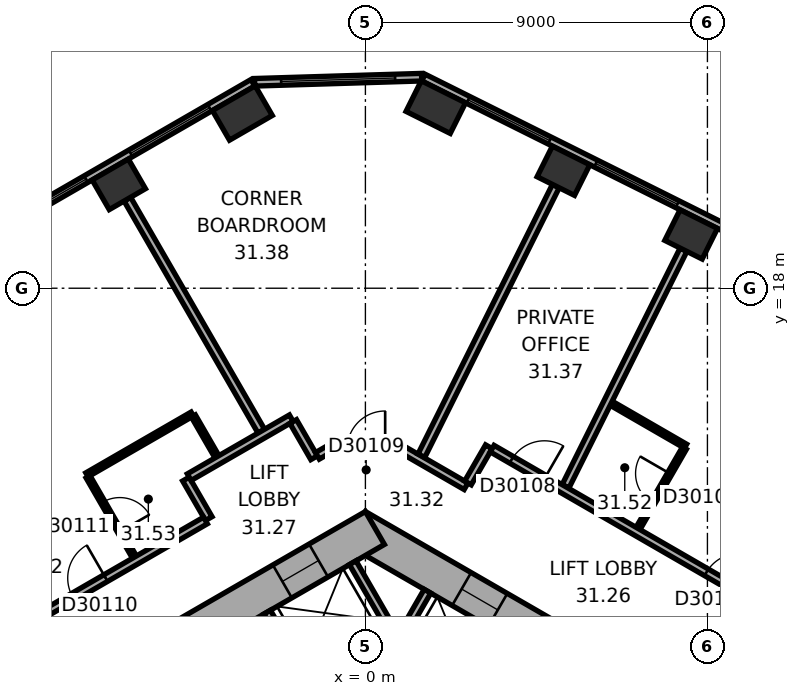
"""IFC4 building model, lengths in metres.
Left out: names, types, materials, properties, quantities, classifications, styles, units other than length and angle.
Written with IfcOpenShell. Run it as: python <this file> out.ifc"""

import sys

from ifc_helpers import new_model, si_unit, direction, frame, frame_2d, origin, origin_2d, place, context, subcontext, project, spatial, rectangle, extrude, element, fill, save


model = new_model("IFC4")
c1 = context("Model", 3, precision=1e-05, world=origin(), true_north=direction((0.0, 1.0)))
c2 = subcontext(c1, "Body", "Model", "MODEL_VIEW")
j1 = project(units=[si_unit("LENGTHUNIT", "METRE"), si_unit("PLANEANGLEUNIT", "RADIAN")], contexts=[c1])
p1 = place(None, origin())
s1 = spatial("IfcSite", under=j1, at=p1, CompositionType="ELEMENT")
p2 = place(p1, origin())
s2 = spatial("IfcBuilding", under=s1, at=p2, CompositionType="ELEMENT")
p3 = place(p2, frame((0.0, 0.0, 128.1)))
s3 = spatial("IfcBuildingStorey", under=s2, at=p3, CompositionType="ELEMENT", Elevation=128.1)
for number, where, z_axis, x_axis in (
    (1, (8.571, 19.416, 0.0), (0.0, 0.0, 1.0), (-0.895, 0.446, 0.0)),
    (2, (5.211, 21.091, 0.0), (0.0, 0.0, 1.0), (-0.895, 0.446, 0.0)),
):
    element("IfcColumn", number, at=place(p3, frame(where, z_axis=z_axis, x_axis=x_axis)), inside=s3, PredefinedType="COLUMN", context=c2, shape_type="SweptSolid", body=[
        extrude(rectangle(XDim=1.1, YDim=0.9, at=origin_2d()), origin(), (0.0, 0.0, 1.0), 3.7),
    ])
for number, where, z_axis, x_axis in (
    (3, (1.852, 22.766, 0.0), (0.0, 0.0, 1.0), (-0.895, 0.446, 0.0)),
    (4, (-3.238, 22.61, 0.0), (0.0, 0.0, 1.0), (-0.866, -0.5, 0.0)),
):
    element("IfcColumn", number, at=place(p3, frame(where, z_axis=z_axis, x_axis=x_axis)), inside=s3, PredefinedType="COLUMN", context=c2, shape_type="SweptSolid", body=[
        extrude(rectangle(XDim=1.3, YDim=0.9, at=origin_2d()), origin(), (0.0, 0.0, 1.0), 3.7),
    ])
p4 = place(p3, frame((-6.489, 20.733, 0.0), z_axis=(0.0, 0.0, 1.0), x_axis=(-0.866025403784, -0.5, 0.0)))
e5 = element("IfcColumn", 5, at=p4, inside=s3, PredefinedType="COLUMN", context=c2, shape_type="SweptSolid", body=[
    extrude(rectangle(XDim=1.1, YDim=0.9, at=origin_2d()), origin(), (0.0, 0.0, 1.0), 3.7),
])
p5 = place(p3, frame((10.25, 5.629, 0.0), z_axis=(0.0, 0.0, 1.0), x_axis=(-0.866022616891, 0.50000482701, 0.0)))
e6 = element("IfcWall", 6, at=p5, inside=s3, PredefinedType="SHEAR", context=c2, shape_type="SweptSolid", body=[
    extrude(rectangle(XDim=12.125, YDim=1.0, at=frame_2d((6.062, 0.0))), origin(), (0.0, 0.0, 1.0), 3.7),
])
p6 = place(p5, frame((2.612, 0.0, 0.0)))
e7 = element("IfcOpeningElement", 7, at=p6, cuts=e6, PredefinedType="OPENING", context=c2, shape_type="SweptSolid", body=[
    extrude(rectangle(XDim=1.1, YDim=2.1, at=frame_2d((0.55, 1.05))), frame((0.0, 0.51, 0.0), z_axis=(0.0, -1.0, 0.0), x_axis=(1.0, 0.0, 0.0)), (0.0, 0.0, 1.0), 1.02),
])
p7 = place(p5, frame((5.212, 0.0, 0.0)))
e8 = element("IfcOpeningElement", 8, at=p7, cuts=e6, PredefinedType="OPENING", context=c2, shape_type="SweptSolid", body=[
    extrude(rectangle(XDim=1.1, YDim=2.1, at=frame_2d((0.55, 1.05))), frame((0.0, 0.51, 0.0), z_axis=(0.0, -1.0, 0.0), x_axis=(1.0, 0.0, 0.0)), (0.0, 0.0, 1.0), 1.02),
])
p8 = place(p5, frame((7.812, 0.0, 0.0)))
e9 = element("IfcOpeningElement", 9, at=p8, cuts=e6, PredefinedType="OPENING", context=c2, shape_type="SweptSolid", body=[
    extrude(rectangle(XDim=1.1, YDim=2.1, at=frame_2d((0.55, 1.05))), frame((0.0, 0.51, 0.0), z_axis=(0.0, -1.0, 0.0), x_axis=(1.0, 0.0, 0.0)), (0.0, 0.0, 1.0), 1.02),
])
p9 = place(p3, frame((0.25, 11.691, 0.0), z_axis=(0.0, 0.0, 1.0), x_axis=(-0.866022616891, -0.50000482701, 0.0)))
e10 = element("IfcWall", 10, at=p9, inside=s3, PredefinedType="SHEAR", context=c2, shape_type="SweptSolid", body=[
    extrude(rectangle(XDim=12.125, YDim=1.0, at=frame_2d((6.062, 0.0))), origin(), (0.0, 0.0, 1.0), 3.7),
])
p10 = place(p9, frame((6.262, 0.0, 0.0)))
e11 = element("IfcOpeningElement", 11, at=p10, cuts=e10, PredefinedType="OPENING", context=c2, shape_type="SweptSolid", body=[
    extrude(rectangle(XDim=1.5, YDim=2.1, at=frame_2d((0.75, 1.05))), frame((0.0, 0.51, 0.0), z_axis=(0.0, -1.0, 0.0), x_axis=(1.0, 0.0, 0.0)), (0.0, 0.0, 1.0), 1.02),
])
p11 = place(p9, frame((1.712, 0.0, 0.0)))
e12 = element("IfcOpeningElement", 12, at=p11, cuts=e10, PredefinedType="OPENING", context=c2, shape_type="SweptSolid", body=[
    extrude(rectangle(XDim=1.1, YDim=2.1, at=frame_2d((0.55, 1.05))), frame((0.0, 0.51, 0.0), z_axis=(0.0, -1.0, 0.0), x_axis=(1.0, 0.0, 0.0)), (0.0, 0.0, 1.0), 1.02),
])
p12 = place(p3, frame((19.464, 14.599, 0.0), z_axis=(0.0, 0.0, 1.0), x_axis=(-0.894935755043, 0.446195018289, 0.0)))
e13 = element("IfcWall", 13, at=p12, inside=s3, PredefinedType="STANDARD", context=c2, shape_type="SweptSolid", body=[
    extrude(rectangle(XDim=20.044, YDim=0.2, at=frame_2d((10.022, 0.0))), origin(), (0.0, 0.0, 1.0), 3.7),
])
p13 = place(p12, frame((1.313, 0.0, 0.9)))
e14 = element("IfcOpeningElement", 14, at=p13, cuts=e13, PredefinedType="OPENING", context=c2, shape_type="SweptSolid", body=[
    extrude(rectangle(XDim=2.4, YDim=2.0, at=frame_2d((1.2, 1.0))), frame((0.0, 0.11, 0.0), z_axis=(0.0, -1.0, 0.0), x_axis=(1.0, 0.0, 0.0)), (0.0, 0.0, 1.0), 0.22),
])
p14 = place(p12, frame((5.067, 0.0, 0.9)))
e15 = element("IfcOpeningElement", 15, at=p14, cuts=e13, PredefinedType="OPENING", context=c2, shape_type="SweptSolid", body=[
    extrude(rectangle(XDim=2.4, YDim=2.0, at=frame_2d((1.2, 1.0))), frame((0.0, 0.11, 0.0), z_axis=(0.0, -1.0, 0.0), x_axis=(1.0, 0.0, 0.0)), (0.0, 0.0, 1.0), 0.22),
])
p15 = place(p12, frame((8.821, 0.0, 0.9)))
e16 = element("IfcOpeningElement", 16, at=p15, cuts=e13, PredefinedType="OPENING", context=c2, shape_type="SweptSolid", body=[
    extrude(rectangle(XDim=2.4, YDim=2.0, at=frame_2d((1.2, 1.0))), frame((0.0, 0.11, 0.0), z_axis=(0.0, -1.0, 0.0), x_axis=(1.0, 0.0, 0.0)), (0.0, 0.0, 1.0), 0.22),
])
p16 = place(p12, frame((12.575, 0.0, 0.9)))
e17 = element("IfcOpeningElement", 17, at=p16, cuts=e13, PredefinedType="OPENING", context=c2, shape_type="SweptSolid", body=[
    extrude(rectangle(XDim=2.4, YDim=2.0, at=frame_2d((1.2, 1.0))), frame((0.0, 0.11, 0.0), z_axis=(0.0, -1.0, 0.0), x_axis=(1.0, 0.0, 0.0)), (0.0, 0.0, 1.0), 0.22),
])
p17 = place(p12, frame((16.329, 0.0, 0.9)))
e18 = element("IfcOpeningElement", 18, at=p17, cuts=e13, PredefinedType="OPENING", context=c2, shape_type="SweptSolid", body=[
    extrude(rectangle(XDim=2.4, YDim=2.0, at=frame_2d((1.2, 1.0))), frame((0.0, 0.11, 0.0), z_axis=(0.0, -1.0, 0.0), x_axis=(1.0, 0.0, 0.0)), (0.0, 0.0, 1.0), 0.22),
])
p18 = place(p3, frame((1.479, 23.553, 0.0), z_axis=(0.0, 0.0, 1.0), x_axis=(-0.999534786117, -0.03049936625, 0.0)))
e19 = element("IfcWall", 19, at=p18, inside=s3, PredefinedType="STANDARD", context=c2, shape_type="SweptSolid", body=[
    extrude(rectangle(XDim=4.395, YDim=0.2, at=frame_2d((2.197, 0.0))), origin(), (0.0, 0.0, 1.0), 3.7),
])
p19 = place(p18, frame((0.698, 0.0, 0.9)))
e20 = element("IfcOpeningElement", 20, at=p19, cuts=e19, PredefinedType="OPENING", context=c2, shape_type="SweptSolid", body=[
    extrude(rectangle(XDim=3.0, YDim=2.0, at=frame_2d((1.5, 1.0))), frame((0.0, 0.11, 0.0), z_axis=(0.0, -1.0, 0.0), x_axis=(1.0, 0.0, 0.0)), (0.0, 0.0, 1.0), 0.22),
])
p20 = place(p3, frame((-2.961, 23.405, 0.0), z_axis=(0.0, 0.0, 1.0), x_axis=(-0.866023315909, -0.500003616288, 0.0)))
e21 = element("IfcWall", 21, at=p20, inside=s3, PredefinedType="STANDARD", context=c2, shape_type="SweptSolid", body=[
    extrude(rectangle(XDim=20.044, YDim=0.2, at=frame_2d((10.022, 0.0))), origin(), (0.0, 0.0, 1.0), 3.7),
])
p21 = place(p20, frame((1.314, 0.0, 0.9)))
e22 = element("IfcOpeningElement", 22, at=p21, cuts=e21, PredefinedType="OPENING", context=c2, shape_type="SweptSolid", body=[
    extrude(rectangle(XDim=2.4, YDim=2.0, at=frame_2d((1.2, 1.0))), frame((0.0, 0.11, 0.0), z_axis=(0.0, -1.0, 0.0), x_axis=(1.0, 0.0, 0.0)), (0.0, 0.0, 1.0), 0.22),
])
p22 = place(p20, frame((5.069, 0.0, 0.9)))
e23 = element("IfcOpeningElement", 23, at=p22, cuts=e21, PredefinedType="OPENING", context=c2, shape_type="SweptSolid", body=[
    extrude(rectangle(XDim=2.4, YDim=2.0, at=frame_2d((1.2, 1.0))), frame((0.0, 0.11, 0.0), z_axis=(0.0, -1.0, 0.0), x_axis=(1.0, 0.0, 0.0)), (0.0, 0.0, 1.0), 0.22),
])
p23 = place(p20, frame((8.823, 0.0, 0.9)))
e24 = element("IfcOpeningElement", 24, at=p23, cuts=e21, PredefinedType="OPENING", context=c2, shape_type="SweptSolid", body=[
    extrude(rectangle(XDim=2.4, YDim=2.0, at=frame_2d((1.2, 1.0))), frame((0.0, 0.11, 0.0), z_axis=(0.0, -1.0, 0.0), x_axis=(1.0, 0.0, 0.0)), (0.0, 0.0, 1.0), 0.22),
])
p24 = place(p20, frame((12.577, 0.0, 0.9)))
e25 = element("IfcOpeningElement", 25, at=p24, cuts=e21, PredefinedType="OPENING", context=c2, shape_type="SweptSolid", body=[
    extrude(rectangle(XDim=2.4, YDim=2.0, at=frame_2d((1.2, 1.0))), frame((0.0, 0.11, 0.0), z_axis=(0.0, -1.0, 0.0), x_axis=(1.0, 0.0, 0.0)), (0.0, 0.0, 1.0), 0.22),
])
p25 = place(p20, frame((16.331, 0.0, 0.9)))
e26 = element("IfcOpeningElement", 26, at=p25, cuts=e21, PredefinedType="OPENING", context=c2, shape_type="SweptSolid", body=[
    extrude(rectangle(XDim=2.4, YDim=2.0, at=frame_2d((1.2, 1.0))), frame((0.0, 0.11, 0.0), z_axis=(0.0, -1.0, 0.0), x_axis=(1.0, 0.0, 0.0)), (0.0, 0.0, 1.0), 0.22),
])
p26 = place(p3, frame((0.532, 8.122, 0.0), z_axis=(0.0, 0.0, 1.0), x_axis=(0.500077893725, 0.86598042715, 0.0)))
e27 = element("IfcWall", 27, at=p26, inside=s3, PredefinedType="PARTITIONING", context=c2, shape_type="SweptSolid", body=[
    extrude(rectangle(XDim=2.2, YDim=0.2, at=frame_2d((1.1, 0.0))), origin(), (0.0, 0.0, 1.0), 3.42),
])
p27 = place(p3, frame((0.767, 8.872, 0.0), z_axis=(0.0, 0.0, 1.0), x_axis=(-0.499994660107, 0.866028486751, 0.0)))
e28 = element("IfcWall", 28, at=p27, inside=s3, PredefinedType="PARTITIONING", context=c2, shape_type="SweptSolid", body=[
    extrude(rectangle(XDim=2.2, YDim=0.2, at=frame_2d((1.1, 0.0))), origin(), (0.0, 0.0, 1.0), 3.42),
])
p28 = place(p3, frame((-1.485, 7.572, 0.0), z_axis=(0.0, 0.0, 1.0), x_axis=(-0.50002983664, 0.866008176907, 0.0)))
e29 = element("IfcWall", 29, at=p28, inside=s3, PredefinedType="PARTITIONING", context=c2, shape_type="SweptSolid", body=[
    extrude(rectangle(XDim=2.2, YDim=0.2, at=frame_2d((1.1, 0.0))), origin(), (0.0, 0.0, 1.0), 3.42),
])
p29 = place(p3, frame((-7.328, 13.09, 0.0), z_axis=(0.0, 0.0, 1.0), x_axis=(0.866008981251, 0.500028443584, 0.0)))
e30 = element("IfcWall", 30, at=p29, inside=s3, PredefinedType="PARTITIONING", context=c2, shape_type="SweptSolid", body=[
    extrude(rectangle(XDim=3.2, YDim=0.12, at=frame_2d((1.6, 0.0))), origin(), (0.0, 0.0, 1.0), 3.42),
])
p30 = place(p3, frame((-6.264, 20.344, 0.0), z_axis=(0.0, 0.0, 1.0), x_axis=(0.500009260695, -0.866020057054, 0.0)))
e31 = element("IfcWall", 31, at=p30, inside=s3, PredefinedType="PARTITIONING", context=c2, shape_type="SweptSolid", body=[
    extrude(rectangle(XDim=7.049, YDim=0.2, at=frame_2d((3.524, 0.0))), origin(), (0.0, 0.0, 1.0), 3.42),
])
p31 = place(p3, frame((-6.078, 10.925, 0.0), z_axis=(0.0, 0.0, 1.0), x_axis=(-0.500002508028, 0.866023955769, 0.0)))
e32 = element("IfcWall", 32, at=p31, inside=s3, PredefinedType="PARTITIONING", context=c2, shape_type="SweptSolid", body=[
    extrude(rectangle(XDim=2.44, YDim=0.12, at=frame_2d((1.22, 0.0))), origin(), (0.0, 0.0, 1.0), 2.87),
])
p32 = place(p31, frame((0.77, 0.0, 0.0)))
e33 = element("IfcOpeningElement", 33, at=p32, cuts=e32, PredefinedType="OPENING", context=c2, shape_type="SweptSolid", body=[
    extrude(rectangle(XDim=0.9, YDim=2.1, at=frame_2d((0.45, 1.05))), frame((0.0, 0.07, 0.0), z_axis=(0.0, -1.0, 0.0), x_axis=(1.0, 0.0, 0.0)), (0.0, 0.0, 1.0), 0.14),
])
p33 = place(p3, frame((-4.723, 12.978, 0.0), z_axis=(0.0, 0.0, 1.0), x_axis=(0.500074377092, -0.865982457891, 0.0)))
e34 = element("IfcWall", 34, at=p33, inside=s3, PredefinedType="PARTITIONING", context=c2, shape_type="SweptSolid", body=[
    extrude(rectangle(XDim=1.201, YDim=0.2, at=frame_2d((0.601, 0.0))), origin(), (0.0, 0.0, 1.0), 3.42),
])
p34 = place(p3, frame((-4.526, 14.638, 0.0), z_axis=(0.0, 0.0, 1.0), x_axis=(0.499932836684, -0.86606417707, 0.0)))
e35 = element("IfcWall", 35, at=p34, inside=s3, PredefinedType="PARTITIONING", context=c2, shape_type="SweptSolid", body=[
    extrude(rectangle(XDim=1.239, YDim=0.12, at=frame_2d((0.62, 0.0))), origin(), (0.0, 0.0, 1.0), 3.42),
])
p35 = place(p3, frame((-4.209, 11.888, 0.0), z_axis=(0.0, 0.0, 1.0), x_axis=(-0.866020930448, -0.500007747966, 0.0)))
e36 = element("IfcWall", 36, at=p35, inside=s3, PredefinedType="PARTITIONING", context=c2, shape_type="SweptSolid", body=[
    extrude(rectangle(XDim=8.321, YDim=0.2, at=frame_2d((4.161, 0.0))), origin(), (0.0, 0.0, 1.0), 3.42),
])
p36 = place(p35, frame((3.031, 0.0, 0.0)))
e37 = element("IfcOpeningElement", 37, at=p36, cuts=e36, PredefinedType="OPENING", context=c2, shape_type="SweptSolid", body=[
    extrude(rectangle(XDim=1.0, YDim=2.1, at=frame_2d((0.5, 1.05))), frame((0.0, 0.11, 0.0), z_axis=(0.0, -1.0, 0.0), x_axis=(1.0, 0.0, 0.0)), (0.0, 0.0, 1.0), 0.22),
])
p37 = place(p3, frame((-1.95, 14.579, 0.0), z_axis=(0.0, 0.0, 1.0), x_axis=(-0.866011260204, -0.500024496599, 0.0)))
e38 = element("IfcWall", 38, at=p37, inside=s3, PredefinedType="PARTITIONING", context=c2, shape_type="SweptSolid", body=[
    extrude(rectangle(XDim=3.102, YDim=0.2, at=frame_2d((1.551, 0.0))), origin(), (0.0, 0.0, 1.0), 3.42),
])
p38 = place(p3, frame((-1.349, 13.539, 0.0), z_axis=(0.0, 0.0, 1.0), x_axis=(-0.500074377092, 0.865982457891, 0.0)))
e39 = element("IfcWall", 39, at=p38, inside=s3, PredefinedType="PARTITIONING", context=c2, shape_type="SweptSolid", body=[
    extrude(rectangle(XDim=1.101, YDim=0.2, at=frame_2d((0.55, 0.0))), origin(), (0.0, 0.0, 1.0), 3.42),
])
p39 = place(p3, frame((-0.95, 13.77, 0.0), z_axis=(0.0, 0.0, 1.0), x_axis=(-0.865904111586, -0.500210025428, 0.0)))
e40 = element("IfcWall", 40, at=p39, inside=s3, PredefinedType="PARTITIONING", context=c2, shape_type="SweptSolid", body=[
    extrude(rectangle(XDim=0.361, YDim=0.2, at=frame_2d((0.181, 0.0))), origin(), (0.0, 0.0, 1.0), 3.42),
])
p40 = place(p3, frame((0.95, 13.77, 0.0), z_axis=(0.0, 0.0, 1.0), x_axis=(-1.0, 0.0, 0.0)))
e41 = element("IfcWall", 41, at=p40, inside=s3, PredefinedType="PARTITIONING", context=c2, shape_type="SweptSolid", body=[
    extrude(rectangle(XDim=1.86, YDim=0.2, at=frame_2d((0.93, 0.0))), origin(), (0.0, 0.0, 1.0), 3.42),
])
p41 = place(p40, frame((0.43, 0.0, 0.0)))
e42 = element("IfcOpeningElement", 42, at=p41, cuts=e41, PredefinedType="OPENING", context=c2, shape_type="SweptSolid", body=[
    extrude(rectangle(XDim=1.0, YDim=2.1, at=frame_2d((0.5, 1.05))), frame((0.0, 0.11, 0.0), z_axis=(0.0, -1.0, 0.0), x_axis=(1.0, 0.0, 0.0)), (0.0, 0.0, 1.0), 0.22),
])
p42 = place(p3, frame((2.648, 12.789, 0.0), z_axis=(0.0, 0.0, 1.0), x_axis=(-0.8660607342, 0.499938800931, 0.0)))
e43 = element("IfcWall", 43, at=p42, inside=s3, PredefinedType="PARTITIONING", context=c2, shape_type="SweptSolid", body=[
    extrude(rectangle(XDim=1.921, YDim=0.2, at=frame_2d((0.96, 0.0))), origin(), (0.0, 0.0, 1.0), 3.42),
])
p43 = place(p3, frame((3.249, 13.829, 0.0), z_axis=(0.0, 0.0, 1.0), x_axis=(-0.499812034598, -0.866133898465, 0.0)))
e44 = element("IfcWall", 44, at=p43, inside=s3, PredefinedType="PARTITIONING", context=c2, shape_type="SweptSolid", body=[
    extrude(rectangle(XDim=1.101, YDim=0.2, at=frame_2d((0.551, 0.0))), origin(), (0.0, 0.0, 1.0), 3.42),
])
p44 = place(p3, frame((5.01, 20.688, 0.0), z_axis=(0.0, 0.0, 1.0), x_axis=(-0.446203062394, -0.894931744386, 0.0)))
e45 = element("IfcWall", 45, at=p44, inside=s3, PredefinedType="PARTITIONING", context=c2, shape_type="SweptSolid", body=[
    extrude(rectangle(XDim=7.927, YDim=0.2, at=frame_2d((3.963, 0.0))), origin(), (0.0, 0.0, 1.0), 2.87),
])
p45 = place(p3, frame((6.468, 14.973, 0.0), z_axis=(0.0, 0.0, 1.0), x_axis=(0.865993004593, -0.500056112848, 0.0)))
e46 = element("IfcWall", 46, at=p45, inside=s3, PredefinedType="PARTITIONING", context=c2, shape_type="SweptSolid", body=[
    extrude(rectangle(XDim=2.259, YDim=0.12, at=frame_2d((1.129, 0.0))), origin(), (0.0, 0.0, 1.0), 3.42),
])
p46 = place(p3, frame((8.37, 19.013, 0.0), z_axis=(0.0, 0.0, 1.0), x_axis=(-0.446187985757, -0.894939261272, 0.0)))
e47 = element("IfcWall", 47, at=p46, inside=s3, PredefinedType="PARTITIONING", context=c2, shape_type="SweptSolid", body=[
    extrude(rectangle(XDim=6.953, YDim=0.2, at=frame_2d((3.477, 0.0))), origin(), (0.0, 0.0, 1.0), 3.42),
])
p47 = place(p3, frame((8.394, 13.792, 0.0), z_axis=(0.0, 0.0, 1.0), x_axis=(-0.500002508028, -0.866023955769, 0.0)))
e48 = element("IfcWall", 48, at=p47, inside=s3, PredefinedType="PARTITIONING", context=c2, shape_type="SweptSolid", body=[
    extrude(rectangle(XDim=2.44, YDim=0.12, at=frame_2d((1.22, 0.0))), origin(), (0.0, 0.0, 1.0), 3.42),
])
p48 = place(p47, frame((0.77, 0.0, 0.0)))
e49 = element("IfcOpeningElement", 49, at=p48, cuts=e48, PredefinedType="OPENING", context=c2, shape_type="SweptSolid", body=[
    extrude(rectangle(XDim=0.9, YDim=2.1, at=frame_2d((0.45, 1.05))), frame((0.0, 0.07, 0.0), z_axis=(0.0, -1.0, 0.0), x_axis=(1.0, 0.0, 0.0)), (0.0, 0.0, 1.0), 0.14),
])
p49 = place(p3, frame((11.646, 8.981, 0.0), z_axis=(0.0, 0.0, 1.0), x_axis=(-0.866027142779, 0.499996987961, 0.0)))
e50 = element("IfcWall", 50, at=p49, inside=s3, PredefinedType="PARTITIONING", context=c2, shape_type="SweptSolid", body=[
    extrude(rectangle(XDim=9.597, YDim=0.2, at=frame_2d((4.798, 0.0))), origin(), (0.0, 0.0, 1.0), 3.42),
])
p50 = place(p49, frame((2.086, 0.0, 0.0)))
e51 = element("IfcOpeningElement", 51, at=p50, cuts=e50, PredefinedType="OPENING", context=c2, shape_type="SweptSolid", body=[
    extrude(rectangle(XDim=1.0, YDim=2.1, at=frame_2d((0.5, 1.05))), frame((0.0, 0.11, 0.0), z_axis=(0.0, -1.0, 0.0), x_axis=(1.0, 0.0, 0.0)), (0.0, 0.0, 1.0), 0.22),
])
p51 = place(p49, frame((8.01, 0.0, 0.0)))
e52 = element("IfcOpeningElement", 52, at=p51, cuts=e50, PredefinedType="OPENING", context=c2, shape_type="SweptSolid", body=[
    extrude(rectangle(XDim=1.0, YDim=2.1, at=frame_2d((0.5, 1.05))), frame((0.0, 0.11, 0.0), z_axis=(0.0, -1.0, 0.0), x_axis=(1.0, 0.0, 0.0)), (0.0, 0.0, 1.0), 0.22),
])
p52 = place(p16, origin())
e53 = element("IfcWindow", 53, at=p52, inside=s3, PartitioningType="SINGLE_PANEL", PredefinedType="WINDOW", context=c2, shape_type="SweptSolid", body=[
    extrude(rectangle(XDim=2.4, YDim=2.0, at=frame_2d((1.2, 1.0))), frame((0.0, 0.03, 0.0), z_axis=(0.0, -1.0, 0.0), x_axis=(1.0, 0.0, 0.0)), (0.0, 0.0, 1.0), 0.06),
])
fill(e17, e53)
p53 = place(p17, origin())
e54 = element("IfcWindow", 54, at=p53, inside=s3, PartitioningType="SINGLE_PANEL", PredefinedType="WINDOW", context=c2, shape_type="SweptSolid", body=[
    extrude(rectangle(XDim=2.4, YDim=2.0, at=frame_2d((1.2, 1.0))), frame((0.0, 0.03, 0.0), z_axis=(0.0, -1.0, 0.0), x_axis=(1.0, 0.0, 0.0)), (0.0, 0.0, 1.0), 0.06),
])
fill(e18, e54)
p54 = place(p19, origin())
e55 = element("IfcWindow", 55, at=p54, inside=s3, PartitioningType="SINGLE_PANEL", PredefinedType="WINDOW", context=c2, shape_type="SweptSolid", body=[
    extrude(rectangle(XDim=3.0, YDim=2.0, at=frame_2d((1.5, 1.0))), frame((0.0, 0.03, 0.0), z_axis=(0.0, -1.0, 0.0), x_axis=(1.0, 0.0, 0.0)), (0.0, 0.0, 1.0), 0.06),
])
fill(e20, e55)
p55 = place(p21, origin())
e56 = element("IfcWindow", 56, at=p55, inside=s3, PartitioningType="SINGLE_PANEL", PredefinedType="WINDOW", context=c2, shape_type="SweptSolid", body=[
    extrude(rectangle(XDim=2.4, YDim=2.0, at=frame_2d((1.2, 1.0))), frame((0.0, 0.03, 0.0), z_axis=(0.0, -1.0, 0.0), x_axis=(1.0, 0.0, 0.0)), (0.0, 0.0, 1.0), 0.06),
])
fill(e22, e56)
p56 = place(p22, origin())
e57 = element("IfcWindow", 57, at=p56, inside=s3, PartitioningType="SINGLE_PANEL", PredefinedType="WINDOW", context=c2, shape_type="SweptSolid", body=[
    extrude(rectangle(XDim=2.4, YDim=2.0, at=frame_2d((1.2, 1.0))), frame((0.0, 0.03, 0.0), z_axis=(0.0, -1.0, 0.0), x_axis=(1.0, 0.0, 0.0)), (0.0, 0.0, 1.0), 0.06),
])
fill(e23, e57)
p57 = place(p8, origin())
e58 = element("IfcDoor", 58, at=p57, inside=s3, OperationType="DOUBLE_DOOR_SLIDING", PredefinedType="DOOR", context=c2, shape_type="SweptSolid", body=[
    extrude(rectangle(XDim=1.1, YDim=2.1, at=frame_2d((0.55, 1.05))), frame((0.0, 0.025, 0.0), z_axis=(0.0, -1.0, 0.0), x_axis=(1.0, 0.0, 0.0)), (0.0, 0.0, 1.0), 0.05),
])
fill(e9, e58)
p58 = place(p11, origin())
e59 = element("IfcDoor", 59, at=p58, inside=s3, OperationType="DOUBLE_DOOR_SLIDING", PredefinedType="DOOR", context=c2, shape_type="SweptSolid", body=[
    extrude(rectangle(XDim=1.1, YDim=2.1, at=frame_2d((0.55, 1.05))), frame((0.0, 0.025, 0.0), z_axis=(0.0, -1.0, 0.0), x_axis=(1.0, 0.0, 0.0)), (0.0, 0.0, 1.0), 0.05),
])
fill(e12, e59)
p59 = place(p50, origin())
e60 = element("IfcDoor", 60, at=p59, inside=s3, OperationType="SINGLE_SWING_LEFT", PredefinedType="DOOR", context=c2, shape_type="SweptSolid", body=[
    extrude(rectangle(XDim=1.0, YDim=2.1, at=frame_2d((0.5, 1.05))), frame((0.0, 0.025, 0.0), z_axis=(0.0, -1.0, 0.0), x_axis=(1.0, 0.0, 0.0)), (0.0, 0.0, 1.0), 0.05),
])
fill(e51, e60)
p60 = place(p48, origin())
e61 = element("IfcDoor", 61, at=p60, inside=s3, OperationType="SINGLE_SWING_LEFT", PredefinedType="DOOR", context=c2, shape_type="SweptSolid", body=[
    extrude(rectangle(XDim=0.9, YDim=2.1, at=frame_2d((0.45, 1.05))), frame((0.0, 0.025, 0.0), z_axis=(0.0, -1.0, 0.0), x_axis=(1.0, 0.0, 0.0)), (0.0, 0.0, 1.0), 0.05),
])
fill(e49, e61)
p61 = place(p51, origin())
e62 = element("IfcDoor", 62, at=p61, inside=s3, OperationType="SINGLE_SWING_LEFT", PredefinedType="DOOR", context=c2, shape_type="SweptSolid", body=[
    extrude(rectangle(XDim=1.0, YDim=2.1, at=frame_2d((0.5, 1.05))), frame((0.0, 0.025, 0.0), z_axis=(0.0, -1.0, 0.0), x_axis=(1.0, 0.0, 0.0)), (0.0, 0.0, 1.0), 0.05),
])
fill(e52, e62)
p62 = place(p41, origin())
e63 = element("IfcDoor", 63, at=p62, inside=s3, OperationType="SINGLE_SWING_LEFT", PredefinedType="DOOR", context=c2, shape_type="SweptSolid", body=[
    extrude(rectangle(XDim=1.0, YDim=2.1, at=frame_2d((0.5, 1.05))), frame((0.0, 0.025, 0.0), z_axis=(0.0, -1.0, 0.0), x_axis=(1.0, 0.0, 0.0)), (0.0, 0.0, 1.0), 0.05),
])
fill(e42, e63)
p63 = place(p36, origin())
e64 = element("IfcDoor", 64, at=p63, inside=s3, OperationType="SINGLE_SWING_LEFT", PredefinedType="DOOR", context=c2, shape_type="SweptSolid", body=[
    extrude(rectangle(XDim=1.0, YDim=2.1, at=frame_2d((0.5, 1.05))), frame((0.0, 0.025, 0.0), z_axis=(0.0, -1.0, 0.0), x_axis=(1.0, 0.0, 0.0)), (0.0, 0.0, 1.0), 0.05),
])
fill(e37, e64)
p64 = place(p32, origin())
e65 = element("IfcDoor", 65, at=p64, inside=s3, OperationType="SINGLE_SWING_LEFT", PredefinedType="DOOR", context=c2, shape_type="SweptSolid", body=[
    extrude(rectangle(XDim=0.9, YDim=2.1, at=frame_2d((0.45, 1.05))), frame((0.0, 0.025, 0.0), z_axis=(0.0, -1.0, 0.0), x_axis=(1.0, 0.0, 0.0)), (0.0, 0.0, 1.0), 0.05),
])
fill(e33, e65)
save(model, sys.argv[1])
